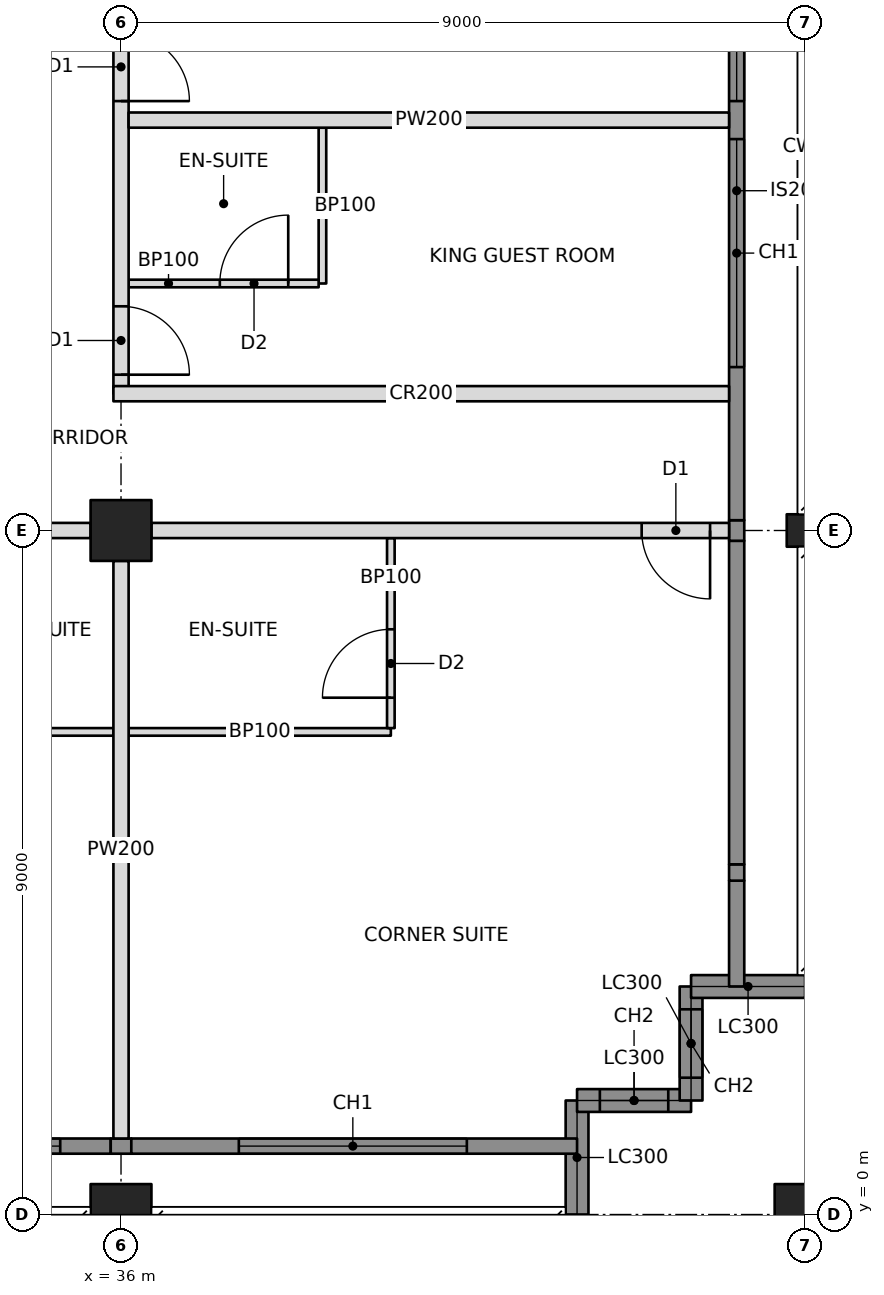
"""IFC4 building model, lengths in metres.
Left out: names, types, materials, properties, quantities, classifications, styles, units other than length and angle.
Written with IfcOpenShell. Run it as: python <this file> out.ifc"""

import sys

from ifc_helpers import new_model, si_unit, direction, frame, frame_2d, origin, origin_2d, place, context, subcontext, project, spatial, rectangle, hollow_rectangle, i_section, extrude, element, fill, save


model = new_model("IFC4")
c1 = context("Model", 3, precision=1e-05, world=origin(), true_north=direction((0.0, 1.0)))
c2 = subcontext(c1, "Body", "Model", "MODEL_VIEW")
j1 = project(units=[si_unit("LENGTHUNIT", "METRE"), si_unit("PLANEANGLEUNIT", "RADIAN")], contexts=[c1])
p1 = place(None, origin())
s1 = spatial("IfcSite", under=j1, at=p1, CompositionType="ELEMENT")
p2 = place(p1, origin())
s2 = spatial("IfcBuilding", under=s1, at=p2, CompositionType="ELEMENT")
p3 = place(p2, frame((0.0, 0.0, 211.4)))
s3 = spatial("IfcBuildingStorey", under=s2, at=p3, CompositionType="ELEMENT", Elevation=211.4)
p4 = place(p3, frame((36.0, 0.0, 0.0), z_axis=(0.0, 0.0, 1.0), x_axis=(1.0, 0.0, 0.0)))
e1 = element("IfcColumn", 1, at=p4, inside=s3, PredefinedType="COLUMN", context=c2, shape_type="SweptSolid", body=[
    extrude(hollow_rectangle(XDim=0.8, YDim=0.8, WallThickness=0.06, at=origin_2d()), origin(), (0.0, 0.0, 1.0), 3.4),
])
p5 = place(p3, frame((36.0, 9.0, 0.0), z_axis=(0.0, 0.0, 1.0), x_axis=(0.0, 1.0, 0.0)))
e2 = element("IfcColumn", 2, at=p5, inside=s3, PredefinedType="COLUMN", context=c2, shape_type="SweptSolid", body=[
    extrude(hollow_rectangle(XDim=0.8, YDim=0.8, WallThickness=0.05, at=origin_2d()), origin(), (0.0, 0.0, 1.0), 3.4),
])
p6 = place(p3, frame((45.0, 0.0, 0.0), z_axis=(0.0, 0.0, 1.0), x_axis=(1.0, 0.0, 0.0)))
e3 = element("IfcColumn", 3, at=p6, inside=s3, PredefinedType="COLUMN", context=c2, shape_type="SweptSolid", body=[
    extrude(hollow_rectangle(XDim=0.8, YDim=0.8, WallThickness=0.06, at=origin_2d()), origin(), (0.0, 0.0, 1.0), 3.4),
])
p7 = place(p3, frame((45.0, 9.0, 0.0), z_axis=(0.0, 0.0, 1.0), x_axis=(0.0, 1.0, 0.0)))
e4 = element("IfcColumn", 4, at=p7, inside=s3, PredefinedType="COLUMN", context=c2, shape_type="SweptSolid", body=[
    extrude(i_section(OverallWidth=0.427, OverallDepth=0.483, WebThickness=0.051, FlangeThickness=0.082, at=origin_2d()), origin(), (0.0, 0.0, 1.0), 3.4),
])
p8 = place(p3, frame((42.0, 0.0, 0.0), z_axis=(0.0, 0.0, 1.0), x_axis=(0.0, 1.0, 0.0)))
e5 = element("IfcWall", 5, at=p8, inside=s3, PredefinedType="SOLIDWALL", context=c2, shape_type="SweptSolid", body=[
    extrude(rectangle(XDim=1.5, YDim=0.3, at=frame_2d((0.75, 0.0))), origin(), (0.0, 0.0, 1.0), 2.42),
])
p9 = place(p3, frame((42.0, 1.5, 0.0), z_axis=(0.0, 0.0, 1.0), x_axis=(1.0, 0.0, 0.0)))
e6 = element("IfcWall", 6, at=p9, inside=s3, PredefinedType="SOLIDWALL", context=c2, shape_type="SweptSolid", body=[
    extrude(rectangle(XDim=1.5, YDim=0.3, at=frame_2d((0.75, 0.0))), origin(), (0.0, 0.0, 1.0), 3.2),
])
p10 = place(p9, frame((0.3, 0.0, 0.6)))
e7 = element("IfcOpeningElement", 7, at=p10, cuts=e6, PredefinedType="OPENING", context=c2, shape_type="SweptSolid", body=[
    extrude(rectangle(XDim=0.9, YDim=2.2, at=frame_2d((0.45, 1.1))), frame((0.0, 0.16, 0.0), z_axis=(0.0, -1.0, 0.0), x_axis=(1.0, 0.0, 0.0)), (0.0, 0.0, 1.0), 0.32),
])
p11 = place(p3, frame((43.5, 1.5, 0.0), z_axis=(0.0, 0.0, 1.0), x_axis=(0.0, 1.0, 0.0)))
e8 = element("IfcWall", 8, at=p11, inside=s3, PredefinedType="SOLIDWALL", context=c2, shape_type="SweptSolid", body=[
    extrude(rectangle(XDim=1.5, YDim=0.3, at=frame_2d((0.75, 0.0))), origin(), (0.0, 0.0, 1.0), 3.2),
])
p12 = place(p11, frame((0.3, 0.0, 0.6)))
e9 = element("IfcOpeningElement", 9, at=p12, cuts=e8, PredefinedType="OPENING", context=c2, shape_type="SweptSolid", body=[
    extrude(rectangle(XDim=0.9, YDim=2.2, at=frame_2d((0.45, 1.1))), frame((0.0, 0.16, 0.0), z_axis=(0.0, -1.0, 0.0), x_axis=(1.0, 0.0, 0.0)), (0.0, 0.0, 1.0), 0.32),
])
p13 = place(p3, frame((43.5, 3.0, 0.0), z_axis=(0.0, 0.0, 1.0), x_axis=(1.0, 0.0, 0.0)))
e10 = element("IfcWall", 10, at=p13, inside=s3, PredefinedType="SOLIDWALL", context=c2, shape_type="SweptSolid", body=[
    extrude(rectangle(XDim=1.5, YDim=0.3, at=frame_2d((0.75, 0.0))), origin(), (0.0, 0.0, 1.0), 2.42),
])
p14 = place(p3, frame((44.1, 3.0, 0.0), z_axis=(0.0, 0.0, 1.0), x_axis=(0.0, 1.0, 0.0)))
e11 = element("IfcWall", 11, at=p14, inside=s3, PredefinedType="SOLIDWALL", context=c2, shape_type="SweptSolid", body=[
    extrude(rectangle(XDim=1.393, YDim=0.2, at=frame_2d((0.696, 0.0))), origin(), (0.0, 0.0, 1.0), 3.2),
])
p15 = place(p3, frame((27.4, 9.0, 0.0), z_axis=(0.0, 0.0, 1.0), x_axis=(1.0, 0.0, 0.0)))
e12 = element("IfcWall", 12, at=p15, inside=s3, PredefinedType="PARTITIONING", context=c2, shape_type="SweptSolid", body=[
    extrude(rectangle(XDim=8.2, YDim=0.2, at=frame_2d((4.1, 0.0))), origin(), (0.0, 0.0, 1.0), 2.405),
])
p16 = place(p15, frame((4.35, 0.0, 0.0)))
e13 = element("IfcOpeningElement", 13, at=p16, cuts=e12, PredefinedType="OPENING", context=c2, shape_type="SweptSolid", body=[
    extrude(rectangle(XDim=0.9, YDim=2.1, at=frame_2d((0.45, 1.05))), frame((0.0, 0.11, 0.0), z_axis=(0.0, -1.0, 0.0), x_axis=(1.0, 0.0, 0.0)), (0.0, 0.0, 1.0), 0.22),
])
p17 = place(p3, frame((36.4, 9.0, 0.0), z_axis=(0.0, 0.0, 1.0), x_axis=(1.0, 0.0, 0.0)))
e14 = element("IfcWall", 14, at=p17, inside=s3, PredefinedType="PARTITIONING", context=c2, shape_type="SweptSolid", body=[
    extrude(rectangle(XDim=7.6, YDim=0.2, at=frame_2d((3.8, 0.0))), origin(), (0.0, 0.0, 1.0), 2.438),
])
p18 = place(p17, frame((6.45, 0.0, 0.0)))
e15 = element("IfcOpeningElement", 15, at=p18, cuts=e14, PredefinedType="OPENING", context=c2, shape_type="SweptSolid", body=[
    extrude(rectangle(XDim=0.9, YDim=2.1, at=frame_2d((0.45, 1.05))), frame((0.0, 0.11, 0.0), z_axis=(0.0, -1.0, 0.0), x_axis=(1.0, 0.0, 0.0)), (0.0, 0.0, 1.0), 0.22),
])
p19 = place(p3, frame((36.0, 10.8, 0.0), z_axis=(0.0, 0.0, 1.0), x_axis=(0.0, 1.0, 0.0)))
e16 = element("IfcWall", 16, at=p19, inside=s3, PredefinedType="PARTITIONING", context=c2, shape_type="SweptSolid", body=[
    extrude(rectangle(XDim=6.8, YDim=0.2, at=frame_2d((3.4, 0.0))), origin(), (0.0, 0.0, 1.0), 2.405),
])
p20 = place(p19, frame((0.25, 0.0, 0.0)))
e17 = element("IfcOpeningElement", 17, at=p20, cuts=e16, PredefinedType="OPENING", context=c2, shape_type="SweptSolid", body=[
    extrude(rectangle(XDim=0.9, YDim=2.1, at=frame_2d((0.45, 1.05))), frame((0.0, 0.11, 0.0), z_axis=(0.0, -1.0, 0.0), x_axis=(1.0, 0.0, 0.0)), (0.0, 0.0, 1.0), 0.22),
])
p21 = place(p19, frame((3.85, 0.0, 0.0)))
e18 = element("IfcOpeningElement", 18, at=p21, cuts=e16, PredefinedType="OPENING", context=c2, shape_type="SweptSolid", body=[
    extrude(rectangle(XDim=0.9, YDim=2.1, at=frame_2d((0.45, 1.05))), frame((0.0, 0.11, 0.0), z_axis=(0.0, -1.0, 0.0), x_axis=(1.0, 0.0, 0.0)), (0.0, 0.0, 1.0), 0.22),
])
p22 = place(p3, frame((35.9, 10.8, 0.0), z_axis=(0.0, 0.0, 1.0), x_axis=(1.0, 0.0, 0.0)))
e19 = element("IfcWall", 19, at=p22, inside=s3, PredefinedType="PARTITIONING", context=c2, shape_type="SweptSolid", body=[
    extrude(rectangle(XDim=8.1, YDim=0.2, at=frame_2d((4.05, 0.0))), origin(), (0.0, 0.0, 1.0), 2.404),
])
p23 = place(p3, frame((36.0, 8.6, 0.0), z_axis=(0.0, 0.0, 1.0), x_axis=(0.0, -1.0, 0.0)))
e20 = element("IfcWall", 20, at=p23, inside=s3, PredefinedType="PARTITIONING", context=c2, shape_type="SweptSolid", body=[
    extrude(rectangle(XDim=7.6, YDim=0.2, at=frame_2d((3.8, 0.0))), origin(), (0.0, 0.0, 1.0), 2.438),
])
p24 = place(p3, frame((32.95, 6.35, 0.0), z_axis=(0.0, 0.0, 1.0), x_axis=(1.0, 0.0, 0.0)))
e21 = element("IfcWall", 21, at=p24, inside=s3, PredefinedType="PARTITIONING", context=c2, shape_type="SweptSolid", body=[
    extrude(rectangle(XDim=2.95, YDim=0.1, at=frame_2d((1.475, 0.0))), origin(), (0.0, 0.0, 1.0), 2.438),
])
p25 = place(p3, frame((36.1, 6.35, 0.0), z_axis=(0.0, 0.0, 1.0), x_axis=(1.0, 0.0, 0.0)))
e22 = element("IfcWall", 22, at=p25, inside=s3, PredefinedType="PARTITIONING", context=c2, shape_type="SweptSolid", body=[
    extrude(rectangle(XDim=3.45, YDim=0.1, at=frame_2d((1.725, 0.0))), origin(), (0.0, 0.0, 1.0), 2.438),
])
p26 = place(p3, frame((39.55, 8.9, 0.0), z_axis=(0.0, 0.0, 1.0), x_axis=(0.0, -1.0, 0.0)))
e23 = element("IfcWall", 23, at=p26, inside=s3, PredefinedType="PARTITIONING", context=c2, shape_type="SweptSolid", body=[
    extrude(rectangle(XDim=2.5, YDim=0.1, at=frame_2d((1.25, 0.0))), origin(), (0.0, 0.0, 1.0), 2.438),
])
p27 = place(p26, frame((1.2, 0.0, 0.0)))
e24 = element("IfcOpeningElement", 24, at=p27, cuts=e23, PredefinedType="OPENING", context=c2, shape_type="SweptSolid", body=[
    extrude(rectangle(XDim=0.9, YDim=2.1, at=frame_2d((0.45, 1.05))), frame((0.0, 0.06, 0.0), z_axis=(0.0, -1.0, 0.0), x_axis=(1.0, 0.0, 0.0)), (0.0, 0.0, 1.0), 0.12),
])
p28 = place(p3, frame((36.1, 14.4, 0.0), z_axis=(0.0, 0.0, 1.0), x_axis=(1.0, 0.0, 0.0)))
e25 = element("IfcWall", 25, at=p28, inside=s3, PredefinedType="PARTITIONING", context=c2, shape_type="SweptSolid", body=[
    extrude(rectangle(XDim=7.9, YDim=0.2, at=frame_2d((3.95, 0.0))), origin(), (0.0, 0.0, 1.0), 2.404),
])
p29 = place(p3, frame((38.65, 12.25, 0.0), z_axis=(0.0, 0.0, 1.0), x_axis=(0.0, 1.0, 0.0)))
e26 = element("IfcWall", 26, at=p29, inside=s3, PredefinedType="PARTITIONING", context=c2, shape_type="SweptSolid", body=[
    extrude(rectangle(XDim=2.05, YDim=0.1, at=frame_2d((1.025, 0.0))), origin(), (0.0, 0.0, 1.0), 3.2),
])
p30 = place(p3, frame((36.1, 12.25, 0.0), z_axis=(0.0, 0.0, 1.0), x_axis=(1.0, 0.0, 0.0)))
e27 = element("IfcWall", 27, at=p30, inside=s3, PredefinedType="PARTITIONING", context=c2, shape_type="SweptSolid", body=[
    extrude(rectangle(XDim=2.5, YDim=0.1, at=frame_2d((1.25, 0.0))), origin(), (0.0, 0.0, 1.0), 2.404),
])
p31 = place(p30, frame((1.2, 0.0, 0.0)))
e28 = element("IfcOpeningElement", 28, at=p31, cuts=e27, PredefinedType="OPENING", context=c2, shape_type="SweptSolid", body=[
    extrude(rectangle(XDim=0.9, YDim=2.1, at=frame_2d((0.45, 1.05))), frame((0.0, 0.06, 0.0), z_axis=(0.0, -1.0, 0.0), x_axis=(1.0, 0.0, 0.0)), (0.0, 0.0, 1.0), 0.12),
])
p32 = place(p3, frame((27.194, 0.9, 0.0), z_axis=(0.0, 0.0, 1.0), x_axis=(1.0, 0.0, 0.0)))
e29 = element("IfcWall", 29, at=p32, inside=s3, PredefinedType="SOLIDWALL", context=c2, shape_type="SweptSolid", body=[
    extrude(rectangle(XDim=8.671, YDim=0.2, at=frame_2d((4.335, 0.0))), origin(), (0.0, 0.0, 1.0), 3.2),
])
p33 = place(p32, frame((0.606, 0.0, 0.6)))
e30 = element("IfcOpeningElement", 30, at=p33, cuts=e29, PredefinedType="OPENING", context=c2, shape_type="SweptSolid", body=[
    extrude(rectangle(XDim=3.0, YDim=2.2, at=frame_2d((1.5, 1.1))), frame((0.0, 0.11, 0.0), z_axis=(0.0, -1.0, 0.0), x_axis=(1.0, 0.0, 0.0)), (0.0, 0.0, 1.0), 0.22),
])
p34 = place(p32, frame((5.006, 0.0, 0.6)))
e31 = element("IfcOpeningElement", 31, at=p34, cuts=e29, PredefinedType="OPENING", context=c2, shape_type="SweptSolid", body=[
    extrude(rectangle(XDim=3.0, YDim=2.2, at=frame_2d((1.5, 1.1))), frame((0.0, 0.11, 0.0), z_axis=(0.0, -1.0, 0.0), x_axis=(1.0, 0.0, 0.0)), (0.0, 0.0, 1.0), 0.22),
])
p35 = place(p3, frame((35.865, 0.9, 0.0), z_axis=(0.0, 0.0, 1.0), x_axis=(1.0, 0.0, 0.0)))
e32 = element("IfcWall", 32, at=p35, inside=s3, PredefinedType="SOLIDWALL", context=c2, shape_type="SweptSolid", body=[
    extrude(rectangle(XDim=0.271, YDim=0.2, at=frame_2d((0.135, 0.0))), origin(), (0.0, 0.0, 1.0), 2.438),
])
p36 = place(p3, frame((36.135, 0.9, 0.0), z_axis=(0.0, 0.0, 1.0), x_axis=(1.0, 0.0, 0.0)))
e33 = element("IfcWall", 33, at=p36, inside=s3, PredefinedType="SOLIDWALL", context=c2, shape_type="SweptSolid", body=[
    extrude(rectangle(XDim=5.865, YDim=0.2, at=frame_2d((2.932, 0.0))), origin(), (0.0, 0.0, 1.0), 3.2),
])
p37 = place(p36, frame((1.415, 0.0, 0.6)))
e34 = element("IfcOpeningElement", 34, at=p37, cuts=e33, PredefinedType="OPENING", context=c2, shape_type="SweptSolid", body=[
    extrude(rectangle(XDim=3.0, YDim=2.2, at=frame_2d((1.5, 1.1))), frame((0.0, 0.11, 0.0), z_axis=(0.0, -1.0, 0.0), x_axis=(1.0, 0.0, 0.0)), (0.0, 0.0, 1.0), 0.22),
])
p38 = place(p3, frame((44.1, 4.393, 0.0), z_axis=(0.0, 0.0, 1.0), x_axis=(0.0, 1.0, 0.0)))
e35 = element("IfcWall", 35, at=p38, inside=s3, PredefinedType="SOLIDWALL", context=c2, shape_type="SweptSolid", body=[
    extrude(rectangle(XDim=0.215, YDim=0.2, at=frame_2d((0.107, 0.0))), origin(), (0.0, 0.0, 1.0), 2.661),
])
p39 = place(p3, frame((44.1, 4.607, 0.0), z_axis=(0.0, 0.0, 1.0), x_axis=(0.0, 1.0, 0.0)))
e36 = element("IfcWall", 36, at=p39, inside=s3, PredefinedType="SOLIDWALL", context=c2, shape_type="SweptSolid", body=[
    extrude(rectangle(XDim=4.257, YDim=0.2, at=frame_2d((2.129, 0.0))), origin(), (0.0, 0.0, 1.0), 3.2),
])
p40 = place(p3, frame((44.1, 8.865, 0.0), z_axis=(0.0, 0.0, 1.0), x_axis=(0.0, 1.0, 0.0)))
e37 = element("IfcWall", 37, at=p40, inside=s3, PredefinedType="SOLIDWALL", context=c2, shape_type="SweptSolid", body=[
    extrude(rectangle(XDim=0.271, YDim=0.2, at=frame_2d((0.135, 0.0))), origin(), (0.0, 0.0, 1.0), 2.438),
])
p41 = place(p3, frame((44.1, 9.135, 0.0), z_axis=(0.0, 0.0, 1.0), x_axis=(0.0, 1.0, 0.0)))
e38 = element("IfcWall", 38, at=p41, inside=s3, PredefinedType="SOLIDWALL", context=c2, shape_type="SweptSolid", body=[
    extrude(rectangle(XDim=8.671, YDim=0.2, at=frame_2d((4.335, 0.0))), origin(), (0.0, 0.0, 1.0), 3.2),
])
p42 = place(p41, frame((2.015, 0.0, 0.6)))
e39 = element("IfcOpeningElement", 39, at=p42, cuts=e38, PredefinedType="OPENING", context=c2, shape_type="SweptSolid", body=[
    extrude(rectangle(XDim=3.0, YDim=2.2, at=frame_2d((1.5, 1.1))), frame((0.0, 0.11, 0.0), z_axis=(0.0, -1.0, 0.0), x_axis=(1.0, 0.0, 0.0)), (0.0, 0.0, 1.0), 0.22),
])
p43 = place(p41, frame((5.515, 0.0, 0.6)))
e40 = element("IfcOpeningElement", 40, at=p43, cuts=e38, PredefinedType="OPENING", context=c2, shape_type="SweptSolid", body=[
    extrude(rectangle(XDim=3.0, YDim=2.2, at=frame_2d((1.5, 1.1))), frame((0.0, 0.11, 0.0), z_axis=(0.0, -1.0, 0.0), x_axis=(1.0, 0.0, 0.0)), (0.0, 0.0, 1.0), 0.22),
])
p44 = place(p10, origin())
e41 = element("IfcWindow", 41, at=p44, inside=s3, PartitioningType="SINGLE_PANEL", PredefinedType="WINDOW", context=c2, shape_type="SweptSolid", body=[
    extrude(rectangle(XDim=0.9, YDim=2.2, at=frame_2d((0.45, 1.1))), frame((0.0, 0.03, 0.0), z_axis=(0.0, -1.0, 0.0), x_axis=(1.0, 0.0, 0.0)), (0.0, 0.0, 1.0), 0.06),
])
fill(e7, e41)
p45 = place(p12, origin())
e42 = element("IfcWindow", 42, at=p45, inside=s3, PartitioningType="SINGLE_PANEL", PredefinedType="WINDOW", context=c2, shape_type="SweptSolid", body=[
    extrude(rectangle(XDim=0.9, YDim=2.2, at=frame_2d((0.45, 1.1))), frame((0.0, 0.03, 0.0), z_axis=(0.0, -1.0, 0.0), x_axis=(1.0, 0.0, 0.0)), (0.0, 0.0, 1.0), 0.06),
])
fill(e9, e42)
p46 = place(p34, origin())
e43 = element("IfcWindow", 43, at=p46, inside=s3, PartitioningType="TRIPLE_PANEL_VERTICAL", PredefinedType="WINDOW", context=c2, shape_type="SweptSolid", body=[
    extrude(rectangle(XDim=3.0, YDim=2.2, at=frame_2d((1.5, 1.1))), frame((0.0, 0.03, 0.0), z_axis=(0.0, -1.0, 0.0), x_axis=(1.0, 0.0, 0.0)), (0.0, 0.0, 1.0), 0.06),
])
fill(e31, e43)
p47 = place(p37, origin())
e44 = element("IfcWindow", 44, at=p47, inside=s3, PartitioningType="TRIPLE_PANEL_VERTICAL", PredefinedType="WINDOW", context=c2, shape_type="SweptSolid", body=[
    extrude(rectangle(XDim=3.0, YDim=2.2, at=frame_2d((1.5, 1.1))), frame((0.0, 0.03, 0.0), z_axis=(0.0, -1.0, 0.0), x_axis=(1.0, 0.0, 0.0)), (0.0, 0.0, 1.0), 0.06),
])
fill(e34, e44)
p48 = place(p42, origin())
e45 = element("IfcWindow", 45, at=p48, inside=s3, PartitioningType="TRIPLE_PANEL_VERTICAL", PredefinedType="WINDOW", context=c2, shape_type="SweptSolid", body=[
    extrude(rectangle(XDim=3.0, YDim=2.2, at=frame_2d((1.5, 1.1))), frame((0.0, 0.03, 0.0), z_axis=(0.0, -1.0, 0.0), x_axis=(1.0, 0.0, 0.0)), (0.0, 0.0, 1.0), 0.06),
])
fill(e39, e45)
p49 = place(p43, origin())
e46 = element("IfcWindow", 46, at=p49, inside=s3, PartitioningType="TRIPLE_PANEL_VERTICAL", PredefinedType="WINDOW", context=c2, shape_type="SweptSolid", body=[
    extrude(rectangle(XDim=3.0, YDim=2.2, at=frame_2d((1.5, 1.1))), frame((0.0, 0.03, 0.0), z_axis=(0.0, -1.0, 0.0), x_axis=(1.0, 0.0, 0.0)), (0.0, 0.0, 1.0), 0.06),
])
fill(e40, e46)
p50 = place(p27, frame((0.9, 0.0, 0.0), z_axis=(0.0, 0.0, 1.0), x_axis=(-1.0, 0.0, 0.0)))
e47 = element("IfcDoor", 47, at=p50, inside=s3, OperationType="SINGLE_SWING_LEFT", PredefinedType="DOOR", context=c2, shape_type="SweptSolid", body=[
    extrude(rectangle(XDim=0.9, YDim=2.1, at=frame_2d((0.45, 1.05))), frame((0.0, 0.025, 0.0), z_axis=(0.0, -1.0, 0.0), x_axis=(1.0, 0.0, 0.0)), (0.0, 0.0, 1.0), 0.05),
])
fill(e24, e47)
p51 = place(p18, frame((0.9, 0.0, 0.0), z_axis=(0.0, 0.0, 1.0), x_axis=(-1.0, 0.0, 0.0)))
e48 = element("IfcDoor", 48, at=p51, inside=s3, OperationType="SINGLE_SWING_LEFT", PredefinedType="DOOR", context=c2, shape_type="SweptSolid", body=[
    extrude(rectangle(XDim=0.9, YDim=2.1, at=frame_2d((0.45, 1.05))), frame((0.0, 0.025, 0.0), z_axis=(0.0, -1.0, 0.0), x_axis=(1.0, 0.0, 0.0)), (0.0, 0.0, 1.0), 0.05),
])
fill(e15, e48)
p52 = place(p31, origin())
e49 = element("IfcDoor", 49, at=p52, inside=s3, OperationType="SINGLE_SWING_RIGHT", PredefinedType="DOOR", context=c2, shape_type="SweptSolid", body=[
    extrude(rectangle(XDim=0.9, YDim=2.1, at=frame_2d((0.45, 1.05))), frame((0.0, 0.025, 0.0), z_axis=(0.0, -1.0, 0.0), x_axis=(1.0, 0.0, 0.0)), (0.0, 0.0, 1.0), 0.05),
])
fill(e28, e49)
p53 = place(p20, frame((0.9, 0.0, 0.0), z_axis=(0.0, 0.0, 1.0), x_axis=(-1.0, 0.0, 0.0)))
e50 = element("IfcDoor", 50, at=p53, inside=s3, OperationType="SINGLE_SWING_RIGHT", PredefinedType="DOOR", context=c2, shape_type="SweptSolid", body=[
    extrude(rectangle(XDim=0.9, YDim=2.1, at=frame_2d((0.45, 1.05))), frame((0.0, 0.025, 0.0), z_axis=(0.0, -1.0, 0.0), x_axis=(1.0, 0.0, 0.0)), (0.0, 0.0, 1.0), 0.05),
])
fill(e17, e50)
p54 = place(p21, frame((0.9, 0.0, 0.0), z_axis=(0.0, 0.0, 1.0), x_axis=(-1.0, 0.0, 0.0)))
e51 = element("IfcDoor", 51, at=p54, inside=s3, OperationType="SINGLE_SWING_RIGHT", PredefinedType="DOOR", context=c2, shape_type="SweptSolid", body=[
    extrude(rectangle(XDim=0.9, YDim=2.1, at=frame_2d((0.45, 1.05))), frame((0.0, 0.025, 0.0), z_axis=(0.0, -1.0, 0.0), x_axis=(1.0, 0.0, 0.0)), (0.0, 0.0, 1.0), 0.05),
])
fill(e18, e51)
save(model, sys.argv[1])
